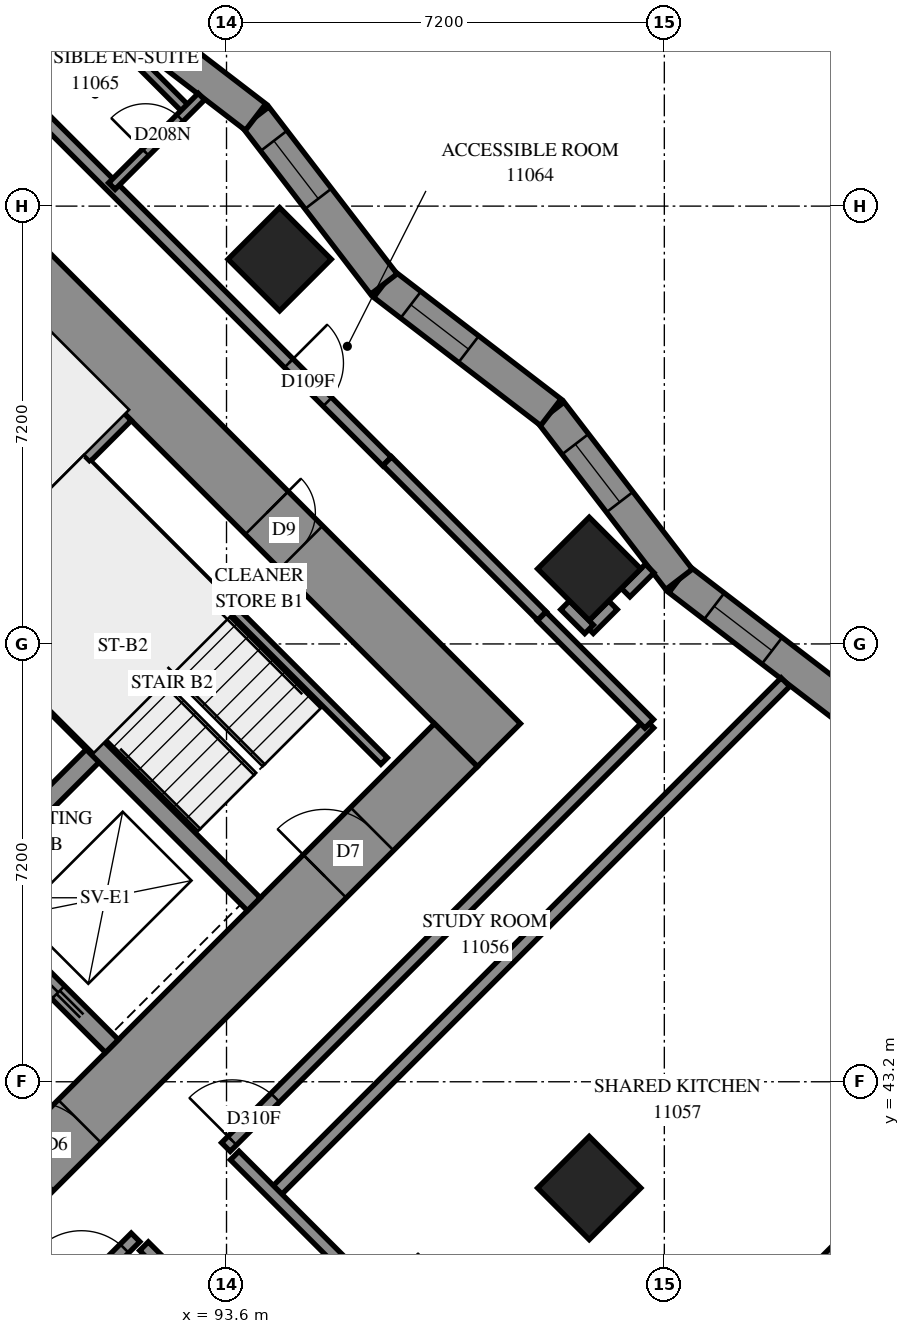
"""IFC4 building model, lengths in metres.
Left out: names, types, materials, properties, quantities, classifications, styles, units other than length and angle.
Written with IfcOpenShell. Run it as: python <this file> out.ifc"""

import sys

from ifc_helpers import new_model, si_unit, direction, frame, frame_2d, origin, origin_2d, place, context, subcontext, project, spatial, polyline, rectangle, outline, extrude, element, fill, save


model = new_model("IFC4")
c1 = context("Model", 3, precision=1e-05, world=origin(), true_north=direction((0.0, 1.0)))
c2 = subcontext(c1, "Body", "Model", "MODEL_VIEW")
j1 = project(units=[si_unit("LENGTHUNIT", "METRE"), si_unit("PLANEANGLEUNIT", "RADIAN")], contexts=[c1])
p1 = place(None, origin())
s1 = spatial("IfcSite", under=j1, at=p1, CompositionType="ELEMENT")
p2 = place(p1, origin())
s2 = spatial("IfcBuilding", under=s1, at=p2, CompositionType="ELEMENT")
p3 = place(p2, frame((0.0, 0.0, 44.0)))
s3 = spatial("IfcBuildingStorey", under=s2, at=p3, CompositionType="ELEMENT", Elevation=44.0)
for number, where, z_axis, x_axis in (
    (1, (94.474, 56.727, 0.0), (0.0, 0.0, 1.0), (0.707, -0.707, 0.0)),
    (2, (99.565, 51.635, 0.0), (0.0, 0.0, 1.0), (0.707, -0.707, 0.0)),
    (3, (99.565, 41.453, 0.0), (0.0, 0.0, 1.0), (0.707, -0.707, 0.0)),
):
    element("IfcColumn", number, at=place(p3, frame(where, z_axis=z_axis, x_axis=x_axis)), inside=s3, PredefinedType="COLUMN", context=c2, shape_type="SweptSolid", body=[
        extrude(rectangle(XDim=1.2, YDim=1.2, at=origin_2d()), origin(), (0.0, 0.0, 1.0), 3.1),
    ])
p4 = place(p3, frame((86.483, 60.333, -0.3), z_axis=(0.0, 0.0, 1.0), x_axis=(0.70710983, -0.7071037324, 0.0)))
e4 = element("IfcWall", 4, at=p4, inside=s3, PredefinedType="SHEAR", context=c2, shape_type="SweptSolid", body=[
    extrude(rectangle(XDim=16.4, YDim=1.0, at=frame_2d((8.2, 0.0))), origin(), (0.0, 0.0, 1.0), 2.7),
])
p5 = place(p4, frame((11.0, 0.0, 0.3)))
e5 = element("IfcOpeningElement", 5, at=p5, cuts=e4, PredefinedType="OPENING", context=c2, shape_type="SweptSolid", body=[
    extrude(rectangle(XDim=0.8, YDim=2.1, at=frame_2d((0.4, 1.05))), frame((0.0, 0.51, 0.0), z_axis=(0.0, -1.0, 0.0), x_axis=(1.0, 0.0, 0.0)), (0.0, 0.0, 1.0), 1.02),
])
p6 = place(p3, frame((87.19, 38.554, -0.3), z_axis=(0.0, 0.0, 1.0), x_axis=(0.707103309, 0.7071102534, 0.0)))
e6 = element("IfcWall", 6, at=p6, inside=s3, PredefinedType="SHEAR", context=c2, shape_type="SweptSolid", body=[
    extrude(rectangle(XDim=14.4, YDim=1.0, at=frame_2d((7.2, 0.0))), origin(), (0.0, 0.0, 1.0), 2.7),
])
p7 = place(p6, frame((4.55, 0.0, 0.3)))
e7 = element("IfcOpeningElement", 7, at=p7, cuts=e6, PredefinedType="OPENING", context=c2, shape_type="SweptSolid", body=[
    extrude(rectangle(XDim=1.1, YDim=2.1, at=frame_2d((0.55, 1.05))), frame((0.0, 0.51, 0.0), z_axis=(0.0, -1.0, 0.0), x_axis=(1.0, 0.0, 0.0)), (0.0, 0.0, 1.0), 1.02),
])
p8 = place(p6, frame((11.35, 0.0, 0.3)))
e8 = element("IfcOpeningElement", 8, at=p8, cuts=e6, PredefinedType="OPENING", context=c2, shape_type="SweptSolid", body=[
    extrude(rectangle(XDim=1.1, YDim=2.1, at=frame_2d((0.55, 1.05))), frame((0.0, 0.51, 0.0), z_axis=(0.0, -1.0, 0.0), x_axis=(1.0, 0.0, 0.0)), (0.0, 0.0, 1.0), 1.02),
])
p9 = place(p3, frame((89.17, 46.332, 0.0), z_axis=(0.0, 0.0, 1.0), x_axis=(0.7071067812, 0.7071067812, 0.0)))
e9 = element("IfcWall", 9, at=p9, inside=s3, PredefinedType="SOLIDWALL", context=c2, shape_type="SweptSolid", body=[
    extrude(rectangle(XDim=3.3, YDim=0.3, at=frame_2d((1.65, 0.0))), origin(), (0.0, 0.0, 1.0), 3.1),
])
p10 = place(p3, frame((81.534, 53.969, 0.0), z_axis=(0.0, 0.0, 1.0), x_axis=(0.707103309, -0.7071102534, 0.0)))
e10 = element("IfcWall", 10, at=p10, inside=s3, PredefinedType="SOLIDWALL", context=c2, shape_type="SweptSolid", body=[
    extrude(rectangle(XDim=14.4, YDim=0.3, at=frame_2d((7.2, 0.0))), origin(), (0.0, 0.0, 1.0), 3.1),
])
p11 = place(p10, frame((12.05, 0.0, 0.0)))
e11 = element("IfcOpeningElement", 11, at=p11, cuts=e10, PredefinedType="OPENING", context=c2, shape_type="SweptSolid", body=[
    extrude(rectangle(XDim=1.1, YDim=2.1, at=frame_2d((0.55, 1.05))), frame((0.0, 0.16, 0.0), z_axis=(0.0, -1.0, 0.0), x_axis=(1.0, 0.0, 0.0)), (0.0, 0.0, 1.0), 0.32),
])
p12 = place(p3, frame((88.958, 51.211, 0.0), z_axis=(0.0, 0.0, 1.0), x_axis=(0.7070998367, -0.7071137256, 0.0)))
e12 = element("IfcWall", 12, at=p12, inside=s3, PredefinedType="SOLIDWALL", context=c2, shape_type="SweptSolid", body=[
    extrude(rectangle(XDim=7.2, YDim=0.3, at=frame_2d((3.6, 0.0))), origin(), (0.0, 0.0, 1.0), 3.1),
])
p13 = place(p3, frame((88.958, 51.211, 0.0), z_axis=(0.0, 0.0, 1.0), x_axis=(0.7071067812, 0.7071067812, 0.0)))
e13 = element("IfcWall", 13, at=p13, inside=s3, PredefinedType="SOLIDWALL", context=c2, shape_type="SweptSolid", body=[
    extrude(rectangle(XDim=4.2, YDim=0.3, at=frame_2d((2.1, 0.0))), origin(), (0.0, 0.0, 1.0), 3.1),
])
p14 = place(p3, frame((103.789, 49.354, 0.0), z_axis=(0.0, 0.0, 1.0), x_axis=(-0.7931776144, 0.6089903711, 0.0)))
e14 = element("IfcWall", 14, at=p14, inside=s3, PredefinedType="SOLIDWALL", context=c2, shape_type="SweptSolid", body=[
    extrude(outline(polyline([(-0.036, -0.275), (3.427, -0.275), (3.499, 0.275), (0.036, 0.275), (-0.036, -0.275)])), origin(), (0.0, 0.0, 1.0), 3.1),
])
p15 = place(p14, frame((1.536, 0.0, 0.5)))
e15 = element("IfcOpeningElement", 15, at=p15, cuts=e14, PredefinedType="OPENING", context=c2, shape_type="SweptSolid", body=[
    extrude(rectangle(XDim=1.2, YDim=2.45, at=frame_2d((0.6, 1.225))), frame((0.0, 0.285, 0.0), z_axis=(0.0, -1.0, 0.0), x_axis=(1.0, 0.0, 0.0)), (0.0, 0.0, 1.0), 0.57),
])
p16 = place(p3, frame((101.042, 51.462, 0.0), z_axis=(0.0, 0.0, 1.0), x_axis=(-0.6089722022, 0.7931915638, 0.0)))
e16 = element("IfcWall", 16, at=p16, inside=s3, PredefinedType="SOLIDWALL", context=c2, shape_type="SweptSolid", body=[
    extrude(outline(polyline([(0.036, -0.275), (3.499, -0.275), (3.427, 0.275), (-0.036, 0.275), (0.036, -0.275)])), origin(), (0.0, 0.0, 1.0), 3.1),
])
p17 = place(p16, frame((1.602, 0.0, 0.5)))
e17 = element("IfcOpeningElement", 17, at=p17, cuts=e16, PredefinedType="OPENING", context=c2, shape_type="SweptSolid", body=[
    extrude(rectangle(XDim=1.2, YDim=2.45, at=frame_2d((0.6, 1.225))), frame((0.0, 0.285, 0.0), z_axis=(0.0, -1.0, 0.0), x_axis=(1.0, 0.0, 0.0)), (0.0, 0.0, 1.0), 0.57),
])
p18 = place(p3, frame((98.934, 54.209, 0.0), z_axis=(0.0, 0.0, 1.0), x_axis=(-0.7931776144, 0.6089903711, 0.0)))
e18 = element("IfcWall", 18, at=p18, inside=s3, PredefinedType="SOLIDWALL", context=c2, shape_type="SweptSolid", body=[
    extrude(outline(polyline([(-0.036, -0.275), (3.427, -0.275), (3.499, 0.275), (0.036, 0.275), (-0.036, -0.275)])), origin(), (0.0, 0.0, 1.0), 3.1),
])
p19 = place(p18, frame((1.704, 0.0, 0.5)))
e19 = element("IfcOpeningElement", 19, at=p19, cuts=e18, PredefinedType="OPENING", context=c2, shape_type="SweptSolid", body=[
    extrude(rectangle(XDim=1.2, YDim=2.45, at=frame_2d((0.6, 1.225))), frame((0.0, 0.285, 0.0), z_axis=(0.0, -1.0, 0.0), x_axis=(1.0, 0.0, 0.0)), (0.0, 0.0, 1.0), 0.57),
])
p20 = place(p3, frame((96.187, 56.318, 0.0), z_axis=(0.0, 0.0, 1.0), x_axis=(-0.6089903711, 0.7931776144, 0.0)))
e20 = element("IfcWall", 20, at=p20, inside=s3, PredefinedType="SOLIDWALL", context=c2, shape_type="SweptSolid", body=[
    extrude(outline(polyline([(0.036, -0.275), (3.499, -0.275), (3.427, 0.275), (-0.036, 0.275), (0.036, -0.275)])), origin(), (0.0, 0.0, 1.0), 3.1),
])
p21 = place(p20, frame((1.77, 0.0, 0.5)))
e21 = element("IfcOpeningElement", 21, at=p21, cuts=e20, PredefinedType="OPENING", context=c2, shape_type="SweptSolid", body=[
    extrude(rectangle(XDim=1.2, YDim=2.45, at=frame_2d((0.6, 1.225))), frame((0.0, 0.285, 0.0), z_axis=(0.0, -1.0, 0.0), x_axis=(1.0, 0.0, 0.0)), (0.0, 0.0, 1.0), 0.57),
])
p22 = place(p3, frame((94.078, 59.065, 0.0), z_axis=(0.0, 0.0, 1.0), x_axis=(-0.7931776144, 0.6089903711, 0.0)))
e22 = element("IfcWall", 22, at=p22, inside=s3, PredefinedType="SOLIDWALL", context=c2, shape_type="SweptSolid", body=[
    extrude(outline(polyline([(-0.036, -0.275), (3.427, -0.275), (3.499, 0.275), (0.036, 0.275), (-0.036, -0.275)])), origin(), (0.0, 0.0, 1.0), 3.1),
])
p23 = place(p22, frame((1.872, 0.0, 0.5)))
e23 = element("IfcOpeningElement", 23, at=p23, cuts=e22, PredefinedType="OPENING", context=c2, shape_type="SweptSolid", body=[
    extrude(rectangle(XDim=1.2, YDim=2.45, at=frame_2d((0.6, 1.225))), frame((0.0, 0.285, 0.0), z_axis=(0.0, -1.0, 0.0), x_axis=(1.0, 0.0, 0.0)), (0.0, 0.0, 1.0), 0.57),
])
p24 = place(p3, frame((91.313, 53.354, 0.0), z_axis=(0.0, 0.0, 1.0), x_axis=(0.7071140275, -0.7070995348, 0.0)))
e24 = element("IfcWall", 24, at=p24, inside=s3, PredefinedType="PARTITIONING", context=c2, shape_type="SweptSolid", body=[
    extrude(rectangle(XDim=6.9, YDim=0.15, at=frame_2d((3.45, 0.0))), origin(), (0.0, 0.0, 1.0), 3.1),
])
p25 = place(p3, frame((99.459, 36.255, 0.0), z_axis=(0.0, 0.0, 1.0), x_axis=(0.7071903932, 0.7070231593, 0.0)))
e25 = element("IfcWall", 25, at=p25, inside=s3, PredefinedType="PARTITIONING", context=c2, shape_type="SweptSolid", body=[
    extrude(rectangle(XDim=11.959, YDim=0.2, at=frame_2d((5.98, 0.0))), origin(), (0.0, 0.0, 1.0), 3.1),
])
p26 = place(p3, frame((94.367, 41.349, 0.0), z_axis=(0.0, 0.0, 1.0), x_axis=(0.7071109781, 0.7071025843, 0.0)))
e26 = element("IfcWall", 26, at=p26, inside=s3, PredefinedType="PARTITIONING", context=c2, shape_type="SweptSolid", body=[
    extrude(rectangle(XDim=11.914, YDim=0.2, at=frame_2d((5.957, 0.0))), origin(), (0.0, 0.0, 1.0), 3.1),
])
p27 = place(p3, frame((93.59, 42.126, 0.0), z_axis=(0.0, 0.0, 1.0), x_axis=(0.7071067812, 0.7071067812, 0.0)))
e27 = element("IfcWall", 27, at=p27, inside=s3, PredefinedType="PARTITIONING", context=c2, shape_type="SweptSolid", body=[
    extrude(rectangle(XDim=9.849, YDim=0.2, at=frame_2d((4.924, 0.0))), origin(), (0.0, 0.0, 1.0), 3.1),
])
p28 = place(p27, frame((0.148, 0.0, 0.0)))
e28 = element("IfcOpeningElement", 28, at=p28, cuts=e27, PredefinedType="OPENING", context=c2, shape_type="SweptSolid", body=[
    extrude(rectangle(XDim=1.0, YDim=2.1, at=frame_2d((0.5, 1.05))), frame((0.0, 0.11, 0.0), z_axis=(0.0, -1.0, 0.0), x_axis=(1.0, 0.0, 0.0)), (0.0, 0.0, 1.0), 0.22),
])
p29 = place(p3, frame((89.451, 60.189, 0.0), z_axis=(0.0, 0.0, 1.0), x_axis=(0.7071796965, -0.7070338583, 0.0)))
e29 = element("IfcWall", 29, at=p29, inside=s3, PredefinedType="PARTITIONING", context=c2, shape_type="SweptSolid", body=[
    extrude(rectangle(XDim=9.6, YDim=0.2, at=frame_2d((4.8, 0.0))), origin(), (0.0, 0.0, 1.0), 3.1),
])
p30 = place(p29, frame((7.315, 0.0, 0.0)))
e30 = element("IfcOpeningElement", 30, at=p30, cuts=e29, PredefinedType="OPENING", context=c2, shape_type="SweptSolid", body=[
    extrude(rectangle(XDim=0.9, YDim=2.1, at=frame_2d((0.45, 1.05))), frame((0.0, 0.11, 0.0), z_axis=(0.0, -1.0, 0.0), x_axis=(1.0, 0.0, 0.0)), (0.0, 0.0, 1.0), 0.22),
])
p31 = place(p3, frame((92.243, 40.495, 0.0), z_axis=(0.0, 0.0, 1.0), x_axis=(0.7071067812, -0.7071067812, 0.0)))
e31 = element("IfcWall", 31, at=p31, inside=s3, PredefinedType="PARTITIONING", context=c2, shape_type="SweptSolid", body=[
    extrude(rectangle(XDim=8.101, YDim=0.2, at=frame_2d((4.05, 0.0))), origin(), (0.0, 0.0, 1.0), 3.1),
])
p32 = place(p31, frame((2.75, 0.0, 0.0)))
e32 = element("IfcOpeningElement", 32, at=p32, cuts=e31, PredefinedType="OPENING", context=c2, shape_type="SweptSolid", body=[
    extrude(rectangle(XDim=0.9, YDim=2.1, at=frame_2d((0.45, 1.05))), frame((0.0, 0.11, 0.0), z_axis=(0.0, -1.0, 0.0), x_axis=(1.0, 0.0, 0.0)), (0.0, 0.0, 1.0), 0.22),
])
p33 = place(p3, frame((86.836, 35.372, 0.0), z_axis=(0.0, 0.0, 1.0), x_axis=(0.7071067812, 0.7071067812, 0.0)))
e33 = element("IfcWall", 33, at=p33, inside=s3, PredefinedType="PARTITIONING", context=c2, shape_type="SweptSolid", body=[
    extrude(rectangle(XDim=7.45, YDim=0.2, at=frame_2d((3.725, 0.0))), origin(), (0.0, 0.0, 1.0), 3.1),
])
p34 = place(p33, frame((6.192, 0.0, 0.0)))
e34 = element("IfcOpeningElement", 34, at=p34, cuts=e33, PredefinedType="OPENING", context=c2, shape_type="SweptSolid", body=[
    extrude(rectangle(XDim=1.0, YDim=2.1, at=frame_2d((0.5, 1.05))), frame((0.0, 0.11, 0.0), z_axis=(0.0, -1.0, 0.0), x_axis=(1.0, 0.0, 0.0)), (0.0, 0.0, 1.0), 0.22),
])
p35 = place(p3, frame((93.735, 41.987, 0.0), z_axis=(0.0, 0.0, 1.0), x_axis=(0.7071067812, -0.7071067812, 0.0)))
e35 = element("IfcWall", 35, at=p35, inside=s3, PredefinedType="PARTITIONING", context=c2, shape_type="SweptSolid", body=[
    extrude(rectangle(XDim=4.5, YDim=0.2, at=frame_2d((2.25, 0.0))), origin(), (0.0, 0.0, 1.0), 3.1),
])
p36 = place(p35, frame((3.274, 0.0, 0.0)))
e36 = element("IfcOpeningElement", 36, at=p36, cuts=e35, PredefinedType="OPENING", context=c2, shape_type="SweptSolid", body=[
    extrude(rectangle(XDim=1.0, YDim=2.1, at=frame_2d((0.5, 1.05))), frame((0.0, 0.11, 0.0), z_axis=(0.0, -1.0, 0.0), x_axis=(1.0, 0.0, 0.0)), (0.0, 0.0, 1.0), 0.22),
])
p37 = place(p3, frame((96.244, 53.406, 0.0), z_axis=(0.0, 0.0, 1.0), x_axis=(0.7068288851, -0.7073845681, 0.0)))
e37 = element("IfcWall", 37, at=p37, inside=s3, PredefinedType="PARTITIONING", context=c2, shape_type="SweptSolid", body=[
    extrude(rectangle(XDim=3.599, YDim=0.2, at=frame_2d((1.8, 0.0))), origin(), (0.0, 0.0, 1.0), 3.1),
])
p38 = place(p3, frame((98.783, 50.855, 0.0), z_axis=(0.0, 0.0, 1.0), x_axis=(0.7071067812, -0.7071067812, 0.0)))
e38 = element("IfcWall", 38, at=p38, inside=s3, PredefinedType="PARTITIONING", context=c2, shape_type="SweptSolid", body=[
    extrude(rectangle(XDim=2.5, YDim=0.2, at=frame_2d((1.25, 0.0))), origin(), (0.0, 0.0, 1.0), 3.1),
])
p39 = place(p3, frame((91.233, 60.894, 0.0), z_axis=(0.0, 0.0, 1.0), x_axis=(0.7071272785, -0.7070862833, 0.0)))
e39 = element("IfcWall", 39, at=p39, inside=s3, PredefinedType="PARTITIONING", context=c2, shape_type="SweptSolid", body=[
    extrude(rectangle(XDim=2.439, YDim=0.15, at=frame_2d((1.22, 0.0))), origin(), (0.0, 0.0, 1.0), 3.1),
])
p40 = place(p3, frame((91.715, 57.929, 0.0), z_axis=(0.0, 0.0, 1.0), x_axis=(0.7070827712, 0.7071307904, 0.0)))
e40 = element("IfcWall", 40, at=p40, inside=s3, PredefinedType="PARTITIONING", context=c2, shape_type="SweptSolid", body=[
    extrude(rectangle(XDim=2.083, YDim=0.15, at=frame_2d((1.041, 0.0))), origin(), (0.0, 0.0, 1.0), 3.1),
])
p41 = place(p40, frame((0.784, 0.0, 0.0)))
e41 = element("IfcOpeningElement", 41, at=p41, cuts=e40, PredefinedType="OPENING", context=c2, shape_type="SweptSolid", body=[
    extrude(rectangle(XDim=0.8, YDim=2.1, at=frame_2d((0.4, 1.05))), frame((0.0, 0.085, 0.0), z_axis=(0.0, -1.0, 0.0), x_axis=(1.0, 0.0, 0.0)), (0.0, 0.0, 1.0), 0.17),
])
for number, where, z_axis, x_axis in (
    (42, (99.561, 50.643, 0.0), (0.0, 0.0, 1.0), (0.707, 0.707, 0.0)),
    (43, (99.168, 51.036, 0.0), (0.0, 0.0, 1.0), (0.707, -0.707, 0.0)),
):
    element("IfcWall", number, at=place(p3, frame(where, z_axis=z_axis, x_axis=x_axis)), inside=s3, PredefinedType="PARTITIONING", context=c2, shape_type="SweptSolid", body=[
        extrude(rectangle(XDim=0.557, YDim=0.2, at=frame_2d((0.279, 0.0))), origin(), (0.0, 0.0, 1.0), 3.1),
    ])
p42 = place(p3, frame((100.163, 51.245, 0.0), z_axis=(0.0, 0.0, 1.0), x_axis=(0.7071067812, 0.7071067812, 0.0)))
e44 = element("IfcWall", 44, at=p42, inside=s3, PredefinedType="PARTITIONING", context=c2, shape_type="SweptSolid", body=[
    extrude(rectangle(XDim=0.56, YDim=0.2, at=frame_2d((0.28, 0.0))), origin(), (0.0, 0.0, 1.0), 3.1),
])
p43 = place(p15, origin())
e45 = element("IfcWindow", 45, at=p43, inside=s3, PartitioningType="SINGLE_PANEL", PredefinedType="WINDOW", context=c2, shape_type="SweptSolid", body=[
    extrude(rectangle(XDim=1.2, YDim=2.45, at=frame_2d((0.6, 1.225))), frame((0.0, 0.155, 0.0), z_axis=(0.0, -1.0, 0.0), x_axis=(1.0, 0.0, 0.0)), (0.0, 0.0, 1.0), 0.06),
])
fill(e15, e45)
p44 = place(p17, origin())
e46 = element("IfcWindow", 46, at=p44, inside=s3, PartitioningType="SINGLE_PANEL", PredefinedType="WINDOW", context=c2, shape_type="SweptSolid", body=[
    extrude(rectangle(XDim=1.2, YDim=2.45, at=frame_2d((0.6, 1.225))), frame((0.0, 0.155, 0.0), z_axis=(0.0, -1.0, 0.0), x_axis=(1.0, 0.0, 0.0)), (0.0, 0.0, 1.0), 0.06),
])
fill(e17, e46)
p45 = place(p19, origin())
e47 = element("IfcWindow", 47, at=p45, inside=s3, PartitioningType="SINGLE_PANEL", PredefinedType="WINDOW", context=c2, shape_type="SweptSolid", body=[
    extrude(rectangle(XDim=1.2, YDim=2.45, at=frame_2d((0.6, 1.225))), frame((0.0, 0.155, 0.0), z_axis=(0.0, -1.0, 0.0), x_axis=(1.0, 0.0, 0.0)), (0.0, 0.0, 1.0), 0.06),
])
fill(e19, e47)
p46 = place(p21, origin())
e48 = element("IfcWindow", 48, at=p46, inside=s3, PartitioningType="SINGLE_PANEL", PredefinedType="WINDOW", context=c2, shape_type="SweptSolid", body=[
    extrude(rectangle(XDim=1.2, YDim=2.45, at=frame_2d((0.6, 1.225))), frame((0.0, 0.155, 0.0), z_axis=(0.0, -1.0, 0.0), x_axis=(1.0, 0.0, 0.0)), (0.0, 0.0, 1.0), 0.06),
])
fill(e21, e48)
p47 = place(p23, origin())
e49 = element("IfcWindow", 49, at=p47, inside=s3, PartitioningType="SINGLE_PANEL", PredefinedType="WINDOW", context=c2, shape_type="SweptSolid", body=[
    extrude(rectangle(XDim=1.2, YDim=2.45, at=frame_2d((0.6, 1.225))), frame((0.0, 0.155, 0.0), z_axis=(0.0, -1.0, 0.0), x_axis=(1.0, 0.0, 0.0)), (0.0, 0.0, 1.0), 0.06),
])
fill(e23, e49)
p48 = place(p5, origin())
e50 = element("IfcDoor", 50, at=p48, inside=s3, OperationType="SINGLE_SWING_RIGHT", PredefinedType="DOOR", context=c2, shape_type="SweptSolid", body=[
    extrude(rectangle(XDim=0.8, YDim=2.1, at=frame_2d((0.4, 1.05))), frame((0.0, -0.44, 0.0), z_axis=(0.0, -1.0, 0.0), x_axis=(1.0, 0.0, 0.0)), (0.0, 0.0, 1.0), 0.05),
])
fill(e5, e50)
p49 = place(p7, origin())
e51 = element("IfcDoor", 51, at=p49, inside=s3, OperationType="DOUBLE_DOOR_SINGLE_SWING", PredefinedType="DOOR", context=c2, shape_type="SweptSolid", body=[
    extrude(rectangle(XDim=1.1, YDim=2.1, at=frame_2d((0.55, 1.05))), frame((0.0, 0.025, 0.0), z_axis=(0.0, -1.0, 0.0), x_axis=(1.0, 0.0, 0.0)), (0.0, 0.0, 1.0), 0.05),
])
fill(e7, e51)
p50 = place(p8, origin())
e52 = element("IfcDoor", 52, at=p50, inside=s3, OperationType="SINGLE_SWING_RIGHT", PredefinedType="DOOR", context=c2, shape_type="SweptSolid", body=[
    extrude(rectangle(XDim=1.1, YDim=2.1, at=frame_2d((0.55, 1.05))), frame((0.0, 0.025, 0.0), z_axis=(0.0, -1.0, 0.0), x_axis=(1.0, 0.0, 0.0)), (0.0, 0.0, 1.0), 0.05),
])
fill(e8, e52)
p51 = place(p11, origin())
e53 = element("IfcDoor", 53, at=p51, inside=s3, OperationType="SLIDING_TO_RIGHT", PredefinedType="DOOR", context=c2, shape_type="SweptSolid", body=[
    extrude(rectangle(XDim=1.1, YDim=2.1, at=frame_2d((0.55, 1.05))), frame((0.0, 0.025, 0.0), z_axis=(0.0, -1.0, 0.0), x_axis=(1.0, 0.0, 0.0)), (0.0, 0.0, 1.0), 0.05),
])
fill(e11, e53)
p52 = place(p28, origin())
e54 = element("IfcDoor", 54, at=p52, inside=s3, OperationType="SINGLE_SWING_LEFT", PredefinedType="DOOR", context=c2, shape_type="SweptSolid", body=[
    extrude(rectangle(XDim=1.0, YDim=2.1, at=frame_2d((0.5, 1.05))), frame((0.0, 0.025, 0.0), z_axis=(0.0, -1.0, 0.0), x_axis=(1.0, 0.0, 0.0)), (0.0, 0.0, 1.0), 0.05),
])
fill(e28, e54)
p53 = place(p30, origin())
e55 = element("IfcDoor", 55, at=p53, inside=s3, OperationType="SINGLE_SWING_LEFT", PredefinedType="DOOR", context=c2, shape_type="SweptSolid", body=[
    extrude(rectangle(XDim=0.9, YDim=2.1, at=frame_2d((0.45, 1.05))), frame((0.0, 0.025, 0.0), z_axis=(0.0, -1.0, 0.0), x_axis=(1.0, 0.0, 0.0)), (0.0, 0.0, 1.0), 0.05),
])
fill(e30, e55)
p54 = place(p41, origin())
e56 = element("IfcDoor", 56, at=p54, inside=s3, OperationType="SINGLE_SWING_RIGHT", PredefinedType="DOOR", context=c2, shape_type="SweptSolid", body=[
    extrude(rectangle(XDim=0.8, YDim=2.1, at=frame_2d((0.4, 1.05))), frame((0.0, 0.025, 0.0), z_axis=(0.0, -1.0, 0.0), x_axis=(1.0, 0.0, 0.0)), (0.0, 0.0, 1.0), 0.05),
])
fill(e41, e56)
p55 = place(p34, origin())
e57 = element("IfcDoor", 57, at=p55, inside=s3, OperationType="SINGLE_SWING_RIGHT", PredefinedType="DOOR", context=c2, shape_type="SweptSolid", body=[
    extrude(rectangle(XDim=1.0, YDim=2.1, at=frame_2d((0.5, 1.05))), frame((0.0, 0.025, 0.0), z_axis=(0.0, -1.0, 0.0), x_axis=(1.0, 0.0, 0.0)), (0.0, 0.0, 1.0), 0.05),
])
fill(e34, e57)
save(model, sys.argv[1])
